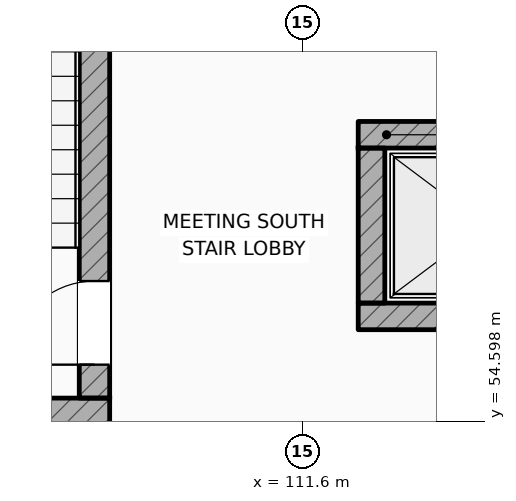
"""IFC4 building model, lengths in metres.
Left out: names, types, materials, properties, quantities, classifications, styles, units other than length and angle.
Written with IfcOpenShell. Run it as: python <this file> out.ifc"""

import sys

from ifc_helpers import new_model, si_unit, direction, frame, frame_2d, origin, place, context, subcontext, project, spatial, rectangle, extrude, element, fill, save


model = new_model("IFC4")
c1 = context("Model", 3, precision=1e-05, world=origin(), true_north=direction((0.0, 1.0)))
c2 = subcontext(c1, "Body", "Model", "MODEL_VIEW")
j1 = project(units=[si_unit("LENGTHUNIT", "METRE"), si_unit("PLANEANGLEUNIT", "RADIAN")], contexts=[c1])
p1 = place(None, origin())
s1 = spatial("IfcSite", under=j1, at=p1, CompositionType="ELEMENT")
p2 = place(p1, origin())
s2 = spatial("IfcBuilding", under=s1, at=p2, CompositionType="ELEMENT")
p3 = place(p2, frame((0.0, 0.0, 6.0)))
s3 = spatial("IfcBuildingStorey", under=s2, at=p3, CompositionType="ELEMENT", Elevation=6.0)
p4 = place(p3, frame((104.1, 54.7, 0.0), z_axis=(0.0, 0.0, 1.0), x_axis=(1.0, 0.0, 0.0)))
e1 = element("IfcWall", 1, at=p4, inside=s3, PredefinedType="SHEAR", context=c2, shape_type="SweptSolid", body=[
    extrude(rectangle(XDim=4.96, YDim=0.4, at=frame_2d((2.48, 0.0))), origin(), (0.0, 0.0, 1.0), 5.4),
])
p5 = place(p3, frame((108.86, 54.9, 0.0), z_axis=(0.0, 0.0, 1.0), x_axis=(0.0, 1.0, 0.0)))
e2 = element("IfcWall", 2, at=p5, inside=s3, PredefinedType="SHEAR", context=c2, shape_type="SweptSolid", body=[
    extrude(rectangle(XDim=9.112, YDim=0.4, at=frame_2d((4.556, 0.0))), origin(), (0.0, 0.0, 1.0), 5.4),
])
p6 = place(p5, frame((0.44, 0.0, 0.0)))
e3 = element("IfcOpeningElement", 3, at=p6, cuts=e2, PredefinedType="OPENING", context=c2, shape_type="SweptSolid", body=[
    extrude(rectangle(XDim=1.1, YDim=2.2, at=frame_2d((0.55, 1.1))), frame((0.0, 0.21, 0.0), z_axis=(0.0, -1.0, 0.0), x_axis=(1.0, 0.0, 0.0)), (0.0, 0.0, 1.0), 0.42),
])
p7 = place(p3, frame((112.33, 58.365, 0.0), z_axis=(0.0, 0.0, 1.0), x_axis=(1.0, 0.0, 0.0)))
e4 = element("IfcWall", 4, at=p7, inside=s3, PredefinedType="SHEAR", context=c2, shape_type="SweptSolid", body=[
    extrude(rectangle(XDim=3.34, YDim=0.35, at=frame_2d((1.67, 0.0))), origin(), (0.0, 0.0, 1.0), 5.05),
])
p8 = place(p7, frame((1.045, 0.0, 0.0)))
e5 = element("IfcOpeningElement", 5, at=p8, cuts=e4, PredefinedType="OPENING", context=c2, shape_type="SweptSolid", body=[
    extrude(rectangle(XDim=1.25, YDim=2.25, at=frame_2d((0.625, 1.125))), frame((0.0, 0.185, 0.0), z_axis=(0.0, -1.0, 0.0), x_axis=(1.0, 0.0, 0.0)), (0.0, 0.0, 1.0), 0.37),
])
p9 = place(p3, frame((112.33, 55.975, 0.0), z_axis=(0.0, 0.0, 1.0), x_axis=(1.0, 0.0, 0.0)))
e6 = element("IfcWall", 6, at=p9, inside=s3, PredefinedType="SHEAR", context=c2, shape_type="SweptSolid", body=[
    extrude(rectangle(XDim=3.34, YDim=0.35, at=frame_2d((1.67, 0.0))), origin(), (0.0, 0.0, 1.0), 5.05),
])
p10 = place(p3, frame((112.505, 56.15, 0.0), z_axis=(0.0, 0.0, 1.0), x_axis=(0.0, 1.0, 0.0)))
e7 = element("IfcWall", 7, at=p10, inside=s3, PredefinedType="SHEAR", context=c2, shape_type="SweptSolid", body=[
    extrude(rectangle(XDim=2.04, YDim=0.35, at=frame_2d((1.02, 0.0))), origin(), (0.0, 0.0, 1.0), 5.05),
])
p11 = place(p6, origin())
e8 = element("IfcDoor", 8, at=p11, inside=s3, OperationType="SINGLE_SWING_LEFT", PredefinedType="DOOR", context=c2, shape_type="SweptSolid", body=[
    extrude(rectangle(XDim=1.1, YDim=2.2, at=frame_2d((0.55, 1.1))), frame((0.0, 0.025, 0.0), z_axis=(0.0, -1.0, 0.0), x_axis=(1.0, 0.0, 0.0)), (0.0, 0.0, 1.0), 0.05),
])
fill(e3, e8)
save(model, sys.argv[1])
